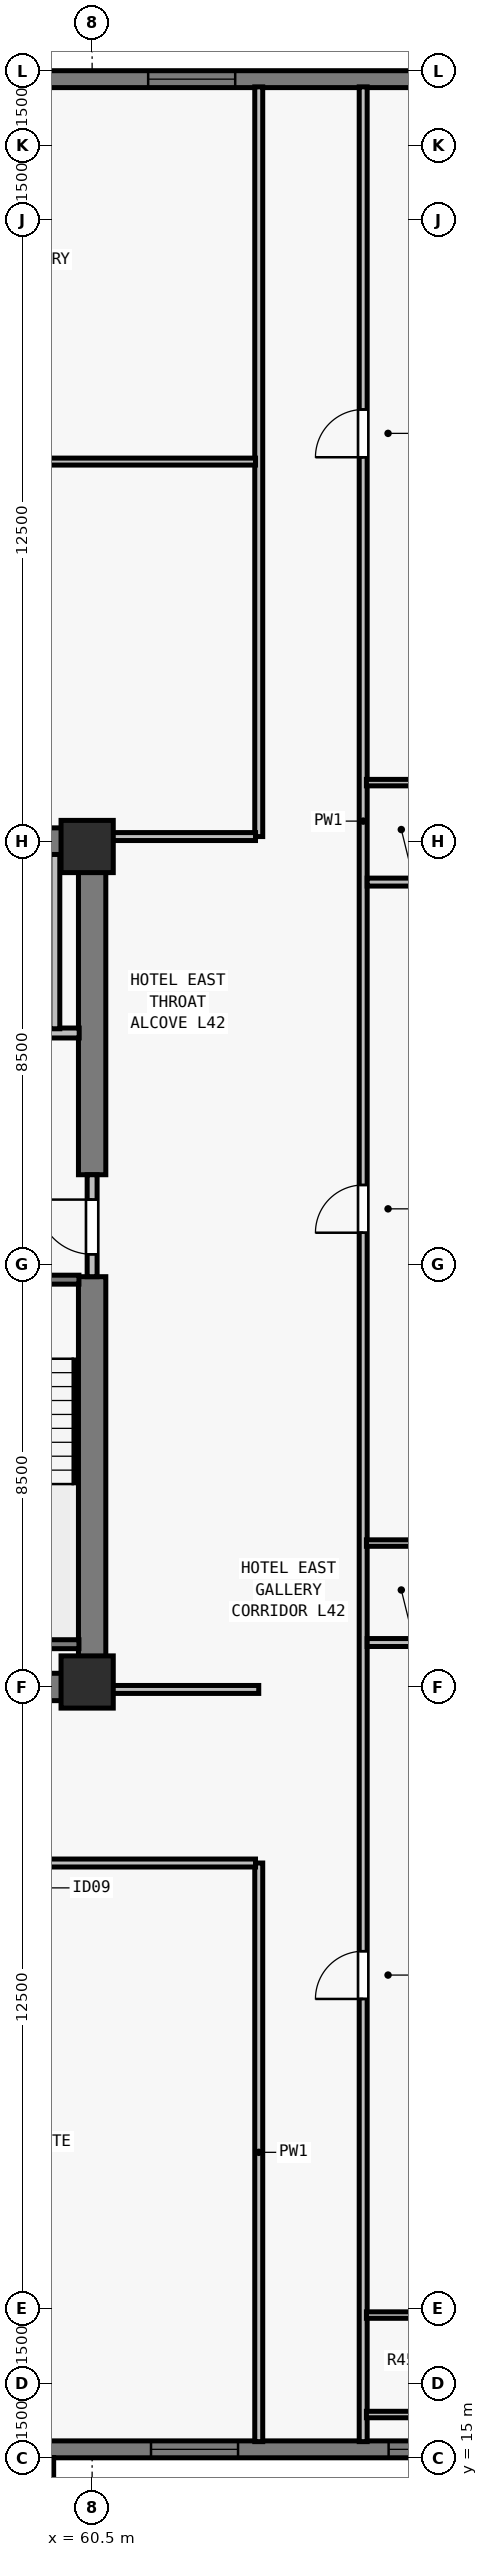
"""IFC4 building model, lengths in metres.
Left out: names, types, materials, properties, quantities, classifications, styles, units other than length and angle.
Written with IfcOpenShell. Run it as: python <this file> out.ifc"""

import sys

from ifc_helpers import new_model, si_unit, direction, frame, frame_2d, origin, origin_2d, place, context, subcontext, project, spatial, rectangle, extrude, element, fill, save


model = new_model("IFC4")
c1 = context("Model", 3, precision=1e-05, world=origin(), true_north=direction((0.0, 1.0)))
c2 = subcontext(c1, "Body", "Model", "MODEL_VIEW")
j1 = project(units=[si_unit("LENGTHUNIT", "METRE"), si_unit("PLANEANGLEUNIT", "RADIAN")], contexts=[c1])
p1 = place(None, origin())
s1 = spatial("IfcSite", under=j1, at=p1, CompositionType="ELEMENT")
p2 = place(p1, origin())
s2 = spatial("IfcBuilding", under=s1, at=p2, CompositionType="ELEMENT")
p3 = place(p2, frame((0.0, 0.0, 155.0)))
s3 = spatial("IfcBuildingStorey", under=s2, at=p3, CompositionType="ELEMENT", Elevation=155.0)
for number, where, z_axis, x_axis in (
    (1, (60.4, 30.6, 0.0), (0.0, 0.0, 1.0), (1.0, 0.0, 0.0)),
    (2, (60.4, 47.4, 0.0), (0.0, 0.0, 1.0), (1.0, 0.0, 0.0)),
):
    element("IfcColumn", number, at=place(p3, frame(where, z_axis=z_axis, x_axis=x_axis)), inside=s3, PredefinedType="COLUMN", context=c2, shape_type="SweptSolid", body=[
        extrude(rectangle(XDim=1.05, YDim=1.05, at=origin_2d()), origin(), (0.0, 0.0, 1.0), 3.5),
    ])
p4 = place(p3, frame((32.0, 62.83, 0.0), z_axis=(0.0, 0.0, 1.0), x_axis=(1.0, 0.0, 0.0)))
e3 = element("IfcWall", 3, at=p4, inside=s3, PredefinedType="SOLIDWALL", context=c2, shape_type="SweptSolid", body=[
    extrude(rectangle(XDim=39.682, YDim=0.34, at=frame_2d((19.841, 0.0))), origin(), (0.0, 0.0, 1.0), 3.28),
])
p5 = place(p4, frame((4.952, 0.0, 0.8)))
e4 = element("IfcOpeningElement", 4, at=p5, cuts=e3, PredefinedType="OPENING", context=c2, shape_type="SweptSolid", body=[
    extrude(rectangle(XDim=1.35, YDim=1.66, at=frame_2d((0.675, 0.83))), frame((0.0, 0.18, 0.0), z_axis=(0.0, -1.0, 0.0), x_axis=(1.0, 0.0, 0.0)), (0.0, 0.0, 1.0), 0.36),
])
p6 = place(p4, frame((12.059, 0.0, 0.8)))
e5 = element("IfcOpeningElement", 5, at=p6, cuts=e3, PredefinedType="OPENING", context=c2, shape_type="SweptSolid", body=[
    extrude(rectangle(XDim=1.35, YDim=1.66, at=frame_2d((0.675, 0.83))), frame((0.0, 0.18, 0.0), z_axis=(0.0, -1.0, 0.0), x_axis=(1.0, 0.0, 0.0)), (0.0, 0.0, 1.0), 0.36),
])
p7 = place(p4, frame((16.262, 0.0, 0.8)))
e6 = element("IfcOpeningElement", 6, at=p7, cuts=e3, PredefinedType="OPENING", context=c2, shape_type="SweptSolid", body=[
    extrude(rectangle(XDim=1.75, YDim=1.66, at=frame_2d((0.875, 0.83))), frame((0.0, 0.18, 0.0), z_axis=(0.0, -1.0, 0.0), x_axis=(1.0, 0.0, 0.0)), (0.0, 0.0, 1.0), 0.36),
])
p8 = place(p4, frame((18.316, 0.0, 0.8)))
e7 = element("IfcOpeningElement", 7, at=p8, cuts=e3, PredefinedType="OPENING", context=c2, shape_type="SweptSolid", body=[
    extrude(rectangle(XDim=1.35, YDim=1.66, at=frame_2d((0.675, 0.83))), frame((0.0, 0.18, 0.0), z_axis=(0.0, -1.0, 0.0), x_axis=(1.0, 0.0, 0.0)), (0.0, 0.0, 1.0), 0.36),
])
p9 = place(p4, frame((22.07, 0.0, 0.8)))
e8 = element("IfcOpeningElement", 8, at=p9, cuts=e3, PredefinedType="OPENING", context=c2, shape_type="SweptSolid", body=[
    extrude(rectangle(XDim=1.75, YDim=1.66, at=frame_2d((0.875, 0.83))), frame((0.0, 0.18, 0.0), z_axis=(0.0, -1.0, 0.0), x_axis=(1.0, 0.0, 0.0)), (0.0, 0.0, 1.0), 0.36),
])
p10 = place(p4, frame((26.273, 0.0, 0.8)))
e9 = element("IfcOpeningElement", 9, at=p10, cuts=e3, PredefinedType="OPENING", context=c2, shape_type="SweptSolid", body=[
    extrude(rectangle(XDim=1.35, YDim=1.66, at=frame_2d((0.675, 0.83))), frame((0.0, 0.18, 0.0), z_axis=(0.0, -1.0, 0.0), x_axis=(1.0, 0.0, 0.0)), (0.0, 0.0, 1.0), 0.36),
])
p11 = place(p4, frame((29.627, 0.0, 0.8)))
e10 = element("IfcOpeningElement", 10, at=p11, cuts=e3, PredefinedType="OPENING", context=c2, shape_type="SweptSolid", body=[
    extrude(rectangle(XDim=1.75, YDim=1.66, at=frame_2d((0.875, 0.83))), frame((0.0, 0.18, 0.0), z_axis=(0.0, -1.0, 0.0), x_axis=(1.0, 0.0, 0.0)), (0.0, 0.0, 1.0), 0.36),
])
p12 = place(p3, frame((72.0, 15.17, 0.0), z_axis=(0.0, 0.0, 1.0), x_axis=(-1.0, 0.0, 0.0)))
e11 = element("IfcWall", 11, at=p12, inside=s3, PredefinedType="SOLIDWALL", context=c2, shape_type="SweptSolid", body=[
    extrude(rectangle(XDim=16.282, YDim=0.34, at=frame_2d((8.141, 0.0))), origin(), (0.0, 0.0, 1.0), 3.28),
])
p13 = place(p12, frame((4.189, 0.0, 0.8)))
e12 = element("IfcOpeningElement", 12, at=p13, cuts=e11, PredefinedType="OPENING", context=c2, shape_type="SweptSolid", body=[
    extrude(rectangle(XDim=1.35, YDim=1.66, at=frame_2d((0.675, 0.83))), frame((0.0, 0.18, 0.0), z_axis=(0.0, -1.0, 0.0), x_axis=(1.0, 0.0, 0.0)), (0.0, 0.0, 1.0), 0.36),
])
p14 = place(p12, frame((8.566, 0.0, 0.8)))
e13 = element("IfcOpeningElement", 13, at=p14, cuts=e11, PredefinedType="OPENING", context=c2, shape_type="SweptSolid", body=[
    extrude(rectangle(XDim=1.75, YDim=1.66, at=frame_2d((0.875, 0.83))), frame((0.0, 0.18, 0.0), z_axis=(0.0, -1.0, 0.0), x_axis=(1.0, 0.0, 0.0)), (0.0, 0.0, 1.0), 0.36),
])
p15 = place(p12, frame((12.493, 0.0, 0.8)))
e14 = element("IfcOpeningElement", 14, at=p15, cuts=e11, PredefinedType="OPENING", context=c2, shape_type="SweptSolid", body=[
    extrude(rectangle(XDim=1.35, YDim=1.66, at=frame_2d((0.675, 0.83))), frame((0.0, 0.18, 0.0), z_axis=(0.0, -1.0, 0.0), x_axis=(1.0, 0.0, 0.0)), (0.0, 0.0, 1.0), 0.36),
])
for number, where, z_axis, x_axis in (
    (15, (43.225, 30.5, 0.0), (0.0, 0.0, 1.0), (1.0, 0.0, 0.0)),
    (16, (43.225, 47.5, 0.0), (0.0, 0.0, 1.0), (1.0, 0.0, 0.0)),
):
    element("IfcWall", number, at=place(p3, frame(where, z_axis=z_axis, x_axis=x_axis)), inside=s3, PredefinedType="SHEAR", context=c2, shape_type="SweptSolid", body=[
        extrude(rectangle(XDim=17.55, YDim=0.55, at=frame_2d((8.775, 0.0))), origin(), (0.0, 0.0, 1.0), 3.28),
    ])
p16 = place(p3, frame((60.5, 30.765, 0.0), z_axis=(0.0, 0.0, 1.0), x_axis=(0.0, 1.0, 0.0)))
e17 = element("IfcWall", 17, at=p16, inside=s3, PredefinedType="SHEAR", context=c2, shape_type="SweptSolid", body=[
    extrude(rectangle(XDim=7.985, YDim=0.55, at=frame_2d((3.993, 0.0))), origin(), (0.0, 0.0, 1.0), 3.28),
])
p17 = place(p3, frame((60.5, 40.8, 0.0), z_axis=(0.0, 0.0, 1.0), x_axis=(0.0, 1.0, 0.0)))
e18 = element("IfcWall", 18, at=p17, inside=s3, PredefinedType="SHEAR", context=c2, shape_type="SweptSolid", body=[
    extrude(rectangle(XDim=6.435, YDim=0.55, at=frame_2d((3.218, 0.0))), origin(), (0.0, 0.0, 1.0), 3.28),
])
p18 = place(p3, frame((60.5, 38.75, 0.0), z_axis=(0.0, 0.0, 1.0), x_axis=(0.0, 1.0, 0.0)))
e19 = element("IfcWall", 19, at=p18, inside=s3, PredefinedType="SOLIDWALL", context=c2, shape_type="SweptSolid", body=[
    extrude(rectangle(XDim=2.05, YDim=0.2, at=frame_2d((1.025, 0.0))), origin(), (0.0, 0.0, 1.0), 3.28),
])
p19 = place(p18, frame((0.45, 0.0, 0.0)))
e20 = element("IfcOpeningElement", 20, at=p19, cuts=e19, PredefinedType="OPENING", context=c2, shape_type="SweptSolid", body=[
    extrude(rectangle(XDim=1.1, YDim=2.15, at=frame_2d((0.55, 1.075))), frame((0.0, 0.11, 0.0), z_axis=(0.0, -1.0, 0.0), x_axis=(1.0, 0.0, 0.0)), (0.0, 0.0, 1.0), 0.22),
])
p20 = place(p3, frame((56.735, 43.65, 0.0), z_axis=(0.0, 0.0, 1.0), x_axis=(1.0, 0.0, 0.0)))
e21 = element("IfcWall", 21, at=p20, inside=s3, PredefinedType="SOLIDWALL", context=c2, shape_type="SweptSolid", body=[
    extrude(rectangle(XDim=3.505, YDim=0.2, at=frame_2d((1.752, 0.0))), origin(), (0.0, 0.0, 1.0), 3.28),
])
p21 = place(p20, frame((1.295, 0.0, 0.0)))
e22 = element("IfcOpeningElement", 22, at=p21, cuts=e21, PredefinedType="OPENING", context=c2, shape_type="SweptSolid", body=[
    extrude(rectangle(XDim=1.1, YDim=2.2, at=frame_2d((0.55, 1.1))), frame((0.0, 0.11, 0.0), z_axis=(0.0, -1.0, 0.0), x_axis=(1.0, 0.0, 0.0)), (0.0, 0.0, 1.0), 0.22),
])
p22 = place(p3, frame((59.75, 43.735, 0.0), z_axis=(0.0, 0.0, 1.0), x_axis=(0.0, 1.0, 0.0)))
e23 = element("IfcWall", 23, at=p22, inside=s3, PredefinedType="SOLIDWALL", context=c2, shape_type="SweptSolid", body=[
    extrude(rectangle(XDim=3.505, YDim=0.2, at=frame_2d((1.752, 0.0))), origin(), (0.0, 0.0, 1.0), 3.28),
])
p23 = place(p3, frame((65.95, 15.325, 0.0), z_axis=(0.0, 0.0, 1.0), x_axis=(0.0, 1.0, 0.0)))
e24 = element("IfcWall", 24, at=p23, inside=s3, PredefinedType="PARTITIONING", context=c2, shape_type="SweptSolid", body=[
    extrude(rectangle(XDim=47.35, YDim=0.16, at=frame_2d((23.675, 0.0))), origin(), (0.0, 0.0, 1.0), 2.555),
])
p24 = place(p23, frame((8.902, 0.0, 0.0)))
e25 = element("IfcOpeningElement", 25, at=p24, cuts=e24, PredefinedType="OPENING", context=c2, shape_type="SweptSolid", body=[
    extrude(rectangle(XDim=0.96, YDim=2.15, at=frame_2d((0.48, 1.075))), frame((0.0, 0.09, 0.0), z_axis=(0.0, -1.0, 0.0), x_axis=(1.0, 0.0, 0.0)), (0.0, 0.0, 1.0), 0.18),
])
p25 = place(p23, frame((24.309, 0.0, 0.0)))
e26 = element("IfcOpeningElement", 26, at=p25, cuts=e24, PredefinedType="OPENING", context=c2, shape_type="SweptSolid", body=[
    extrude(rectangle(XDim=0.96, YDim=2.15, at=frame_2d((0.48, 1.075))), frame((0.0, 0.09, 0.0), z_axis=(0.0, -1.0, 0.0), x_axis=(1.0, 0.0, 0.0)), (0.0, 0.0, 1.0), 0.18),
])
p26 = place(p23, frame((39.902, 0.0, 0.0)))
e27 = element("IfcOpeningElement", 27, at=p26, cuts=e24, PredefinedType="OPENING", context=c2, shape_type="SweptSolid", body=[
    extrude(rectangle(XDim=0.96, YDim=2.15, at=frame_2d((0.48, 1.075))), frame((0.0, 0.09, 0.0), z_axis=(0.0, -1.0, 0.0), x_axis=(1.0, 0.0, 0.0)), (0.0, 0.0, 1.0), 0.18),
])
p27 = place(p3, frame((63.85, 15.325, 0.0), z_axis=(0.0, 0.0, 1.0), x_axis=(0.0, 1.0, 0.0)))
e28 = element("IfcWall", 28, at=p27, inside=s3, PredefinedType="PARTITIONING", context=c2, shape_type="SweptSolid", body=[
    extrude(rectangle(XDim=11.635, YDim=0.16, at=frame_2d((5.817, 0.0))), origin(), (0.0, 0.0, 1.0), 2.555),
])
p28 = place(p3, frame((63.85, 47.6, 0.0), z_axis=(0.0, 0.0, 1.0), x_axis=(0.0, 1.0, 0.0)))
e29 = element("IfcWall", 29, at=p28, inside=s3, PredefinedType="PARTITIONING", context=c2, shape_type="SweptSolid", body=[
    extrude(rectangle(XDim=15.075, YDim=0.16, at=frame_2d((7.538, 0.0))), origin(), (0.0, 0.0, 1.0), 2.555),
])
p29 = place(p3, frame((60.765, 30.45, 0.0), z_axis=(0.0, 0.0, 1.0), x_axis=(1.0, 0.0, 0.0)))
e30 = element("IfcWall", 30, at=p29, inside=s3, PredefinedType="PARTITIONING", context=c2, shape_type="SweptSolid", body=[
    extrude(rectangle(XDim=3.085, YDim=0.16, at=frame_2d((1.542, 0.0))), origin(), (0.0, 0.0, 1.0), 3.28),
])
p30 = place(p3, frame((60.765, 47.6, 0.0), z_axis=(0.0, 0.0, 1.0), x_axis=(1.0, 0.0, 0.0)))
e31 = element("IfcWall", 31, at=p30, inside=s3, PredefinedType="PARTITIONING", context=c2, shape_type="SweptSolid", body=[
    extrude(rectangle(XDim=3.02, YDim=0.16, at=frame_2d((1.51, 0.0))), origin(), (0.0, 0.0, 1.0), 3.28),
])
p31 = place(p3, frame((41.715, 26.96, 0.0), z_axis=(0.0, 0.0, 1.0), x_axis=(1.0, 0.0, 0.0)))
e32 = element("IfcWall", 32, at=p31, inside=s3, PredefinedType="PARTITIONING", context=c2, shape_type="SweptSolid", body=[
    extrude(rectangle(XDim=22.07, YDim=0.16, at=frame_2d((11.035, 0.0))), origin(), (0.0, 0.0, 1.0), 3.28),
])
p32 = place(p31, frame((6.15, 0.0, 0.0)))
e33 = element("IfcOpeningElement", 33, at=p32, cuts=e32, PredefinedType="OPENING", context=c2, shape_type="SweptSolid", body=[
    extrude(rectangle(XDim=0.96, YDim=2.15, at=frame_2d((0.48, 1.075))), frame((0.0, 0.09, 0.0), z_axis=(0.0, -1.0, 0.0), x_axis=(1.0, 0.0, 0.0)), (0.0, 0.0, 1.0), 0.18),
])
p33 = place(p31, frame((16.945, 0.0, 0.0)))
e34 = element("IfcOpeningElement", 34, at=p33, cuts=e32, PredefinedType="OPENING", context=c2, shape_type="SweptSolid", body=[
    extrude(rectangle(XDim=0.96, YDim=2.15, at=frame_2d((0.48, 1.075))), frame((0.0, 0.09, 0.0), z_axis=(0.0, -1.0, 0.0), x_axis=(1.0, 0.0, 0.0)), (0.0, 0.0, 1.0), 0.18),
])
p34 = place(p3, frame((41.715, 55.14, 0.0), z_axis=(0.0, 0.0, 1.0), x_axis=(1.0, 0.0, 0.0)))
e35 = element("IfcWall", 35, at=p34, inside=s3, PredefinedType="PARTITIONING", context=c2, shape_type="SweptSolid", body=[
    extrude(rectangle(XDim=22.07, YDim=0.14, at=frame_2d((11.035, 0.0))), origin(), (0.0, 0.0, 1.0), 3.28),
])
p35 = place(p34, frame((3.435, 0.0, 0.0)))
e36 = element("IfcOpeningElement", 36, at=p35, cuts=e35, PredefinedType="OPENING", context=c2, shape_type="SweptSolid", body=[
    extrude(rectangle(XDim=0.92, YDim=2.12, at=frame_2d((0.46, 1.06))), frame((0.0, 0.08, 0.0), z_axis=(0.0, -1.0, 0.0), x_axis=(1.0, 0.0, 0.0)), (0.0, 0.0, 1.0), 0.16),
])
p36 = place(p34, frame((14.435, 0.0, 0.0)))
e37 = element("IfcOpeningElement", 37, at=p36, cuts=e35, PredefinedType="OPENING", context=c2, shape_type="SweptSolid", body=[
    extrude(rectangle(XDim=0.92, YDim=2.12, at=frame_2d((0.46, 1.06))), frame((0.0, 0.08, 0.0), z_axis=(0.0, -1.0, 0.0), x_axis=(1.0, 0.0, 0.0)), (0.0, 0.0, 1.0), 0.16),
])
for number, where, z_axis, x_axis in (
    (38, (66.015, 15.87, 0.0), (0.0, 0.0, 1.0), (1.0, 0.0, 0.0)),
    (39, (66.015, 17.87, 0.0), (0.0, 0.0, 1.0), (1.0, 0.0, 0.0)),
):
    element("IfcWall", number, at=place(p3, frame(where, z_axis=z_axis, x_axis=x_axis)), inside=s3, PredefinedType="PLUMBINGWALL", context=c2, shape_type="SweptSolid", body=[
        extrude(rectangle(XDim=2.315, YDim=0.13, at=frame_2d((1.158, 0.0))), origin(), (0.0, 0.0, 1.0), 3.28),
    ])
p37 = place(p3, frame((66.03, 31.394, 0.0), z_axis=(0.0, 0.0, 1.0), x_axis=(1.0, 0.0, 0.0)))
e40 = element("IfcWall", 40, at=p37, inside=s3, PredefinedType="PARTITIONING", context=c2, shape_type="SweptSolid", body=[
    extrude(rectangle(XDim=9.645, YDim=0.16, at=frame_2d((4.823, 0.0))), origin(), (0.0, 0.0, 1.0), 3.28),
])
p38 = place(p3, frame((66.015, 33.394, 0.0), z_axis=(0.0, 0.0, 1.0), x_axis=(1.0, 0.0, 0.0)))
e41 = element("IfcWall", 41, at=p38, inside=s3, PredefinedType="PLUMBINGWALL", context=c2, shape_type="SweptSolid", body=[
    extrude(rectangle(XDim=2.315, YDim=0.13, at=frame_2d((1.158, 0.0))), origin(), (0.0, 0.0, 1.0), 3.28),
])
p39 = place(p3, frame((66.03, 46.685, 0.0), z_axis=(0.0, 0.0, 1.0), x_axis=(1.0, 0.0, 0.0)))
e42 = element("IfcWall", 42, at=p39, inside=s3, PredefinedType="PARTITIONING", context=c2, shape_type="SweptSolid", body=[
    extrude(rectangle(XDim=9.645, YDim=0.16, at=frame_2d((4.823, 0.0))), origin(), (0.0, 0.0, 1.0), 3.28),
])
p40 = place(p3, frame((66.015, 48.685, 0.0), z_axis=(0.0, 0.0, 1.0), x_axis=(1.0, 0.0, 0.0)))
e43 = element("IfcWall", 43, at=p40, inside=s3, PredefinedType="PLUMBINGWALL", context=c2, shape_type="SweptSolid", body=[
    extrude(rectangle(XDim=2.315, YDim=0.13, at=frame_2d((1.158, 0.0))), origin(), (0.0, 0.0, 1.0), 3.28),
])
p41 = place(p3, frame((57.005, 38.69, 0.0), z_axis=(0.0, 0.0, 1.0), x_axis=(1.0, 0.0, 0.0)))
e44 = element("IfcWall", 44, at=p41, inside=s3, PredefinedType="SOLIDWALL", context=c2, shape_type="SweptSolid", body=[
    extrude(rectangle(XDim=3.23, YDim=0.18, at=frame_2d((1.615, 0.0))), origin(), (0.0, 0.0, 1.0), 3.28),
])
p42 = place(p41, frame((1.14, 0.0, 0.0)))
e45 = element("IfcOpeningElement", 45, at=p42, cuts=e44, PredefinedType="OPENING", context=c2, shape_type="SweptSolid", body=[
    extrude(rectangle(XDim=0.95, YDim=2.15, at=frame_2d((0.475, 1.075))), frame((0.0, 0.1, 0.0), z_axis=(0.0, -1.0, 0.0), x_axis=(1.0, 0.0, 0.0)), (0.0, 0.0, 1.0), 0.2),
])
p43 = place(p3, frame((57.005, 31.36, 0.0), z_axis=(0.0, 0.0, 1.0), x_axis=(1.0, 0.0, 0.0)))
e46 = element("IfcWall", 46, at=p43, inside=s3, PredefinedType="SOLIDWALL", context=c2, shape_type="SweptSolid", body=[
    extrude(rectangle(XDim=3.23, YDim=0.18, at=frame_2d((1.615, 0.0))), origin(), (0.0, 0.0, 1.0), 3.28),
])
p44 = place(p11, origin())
e47 = element("IfcWindow", 47, at=p44, inside=s3, PartitioningType="SINGLE_PANEL", PredefinedType="WINDOW", context=c2, shape_type="SweptSolid", body=[
    extrude(rectangle(XDim=1.75, YDim=1.66, at=frame_2d((0.875, 0.83))), frame((0.0, -0.05, 0.0), z_axis=(0.0, -1.0, 0.0), x_axis=(1.0, 0.0, 0.0)), (0.0, 0.0, 1.0), 0.06),
])
fill(e10, e47)
p45 = place(p13, origin())
e48 = element("IfcWindow", 48, at=p45, inside=s3, PartitioningType="SINGLE_PANEL", PredefinedType="WINDOW", context=c2, shape_type="SweptSolid", body=[
    extrude(rectangle(XDim=1.35, YDim=1.66, at=frame_2d((0.675, 0.83))), frame((0.0, -0.05, 0.0), z_axis=(0.0, -1.0, 0.0), x_axis=(1.0, 0.0, 0.0)), (0.0, 0.0, 1.0), 0.06),
])
fill(e12, e48)
p46 = place(p14, origin())
e49 = element("IfcWindow", 49, at=p46, inside=s3, PartitioningType="SINGLE_PANEL", PredefinedType="WINDOW", context=c2, shape_type="SweptSolid", body=[
    extrude(rectangle(XDim=1.75, YDim=1.66, at=frame_2d((0.875, 0.83))), frame((0.0, -0.05, 0.0), z_axis=(0.0, -1.0, 0.0), x_axis=(1.0, 0.0, 0.0)), (0.0, 0.0, 1.0), 0.06),
])
fill(e13, e49)
p47 = place(p19, origin())
e50 = element("IfcDoor", 50, at=p47, inside=s3, OperationType="SINGLE_SWING_RIGHT", PredefinedType="DOOR", context=c2, shape_type="SweptSolid", body=[
    extrude(rectangle(XDim=1.1, YDim=2.15, at=frame_2d((0.55, 1.075))), frame((0.0, 0.025, 0.0), z_axis=(0.0, -1.0, 0.0), x_axis=(1.0, 0.0, 0.0)), (0.0, 0.0, 1.0), 0.05),
])
fill(e20, e50)
p48 = place(p24, origin())
e51 = element("IfcDoor", 51, at=p48, inside=s3, OperationType="SINGLE_SWING_LEFT", PredefinedType="DOOR", context=c2, shape_type="SweptSolid", body=[
    extrude(rectangle(XDim=0.96, YDim=2.15, at=frame_2d((0.48, 1.075))), frame((0.0, 0.025, 0.0), z_axis=(0.0, -1.0, 0.0), x_axis=(1.0, 0.0, 0.0)), (0.0, 0.0, 1.0), 0.05),
])
fill(e25, e51)
p49 = place(p25, origin())
e52 = element("IfcDoor", 52, at=p49, inside=s3, OperationType="SINGLE_SWING_LEFT", PredefinedType="DOOR", context=c2, shape_type="SweptSolid", body=[
    extrude(rectangle(XDim=0.96, YDim=2.15, at=frame_2d((0.48, 1.075))), frame((0.0, 0.025, 0.0), z_axis=(0.0, -1.0, 0.0), x_axis=(1.0, 0.0, 0.0)), (0.0, 0.0, 1.0), 0.05),
])
fill(e26, e52)
p50 = place(p26, origin())
e53 = element("IfcDoor", 53, at=p50, inside=s3, OperationType="SINGLE_SWING_LEFT", PredefinedType="DOOR", context=c2, shape_type="SweptSolid", body=[
    extrude(rectangle(XDim=0.96, YDim=2.15, at=frame_2d((0.48, 1.075))), frame((0.0, 0.025, 0.0), z_axis=(0.0, -1.0, 0.0), x_axis=(1.0, 0.0, 0.0)), (0.0, 0.0, 1.0), 0.05),
])
fill(e27, e53)
save(model, sys.argv[1])
